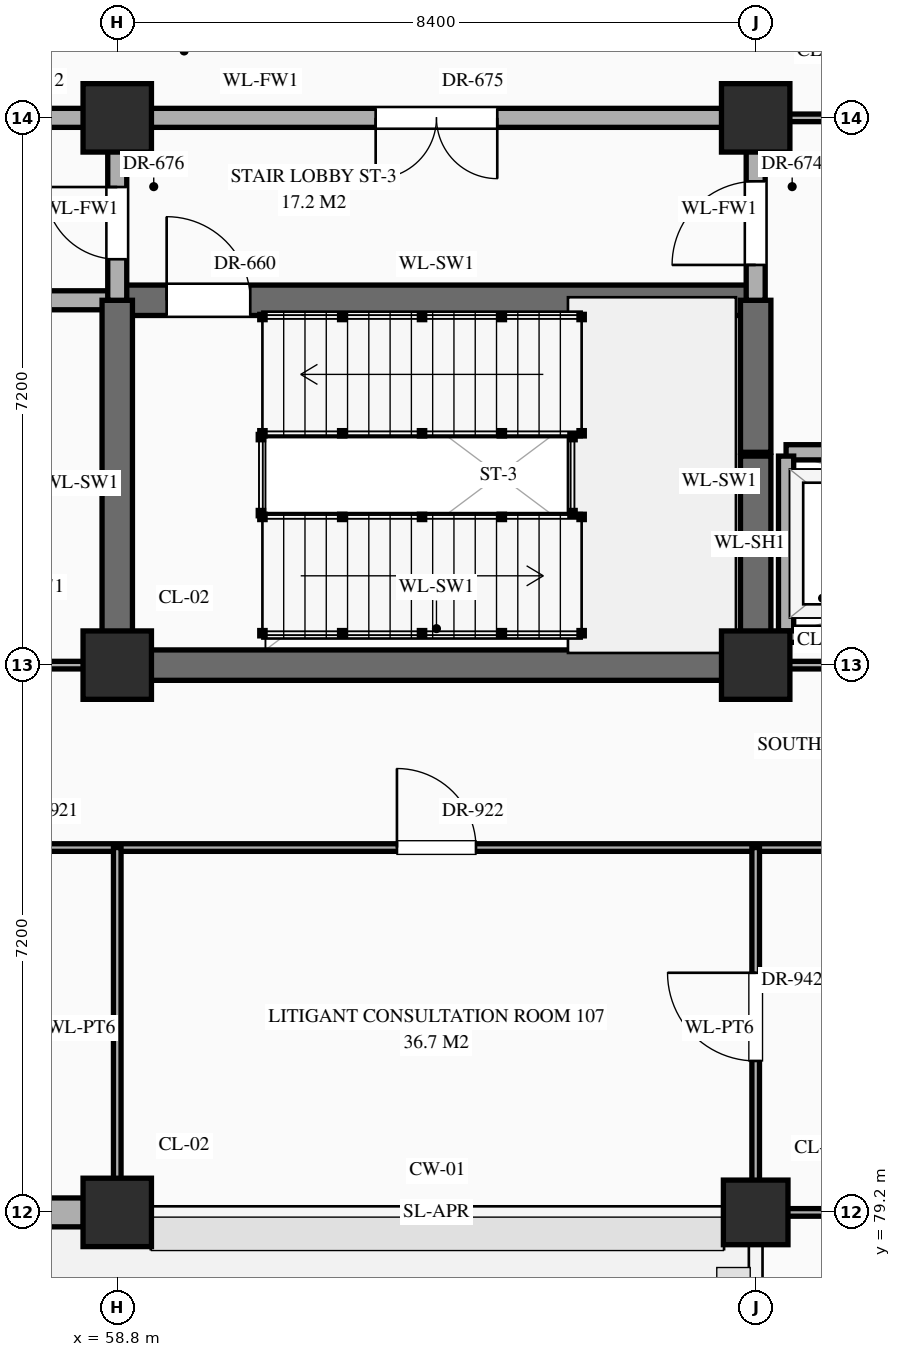
"""IFC4 building model, lengths in metres.
Left out: names, types, materials, properties, quantities, classifications, styles, units other than length and angle.
Written with IfcOpenShell. Run it as: python <this file> out.ifc"""

import sys

from ifc_helpers import new_model, si_unit, direction, frame, frame_2d, origin, origin_2d, place, context, subcontext, project, spatial, rectangle, circle, extrude, element, fill, save


model = new_model("IFC4")
c1 = context("Model", 3, precision=1e-05, world=origin(), true_north=direction((0.0, 1.0)))
c2 = subcontext(c1, "Body", "Model", "MODEL_VIEW")
j1 = project(units=[si_unit("LENGTHUNIT", "METRE"), si_unit("PLANEANGLEUNIT", "RADIAN")], contexts=[c1])
p1 = place(None, origin())
s1 = spatial("IfcSite", under=j1, at=p1, CompositionType="ELEMENT")
p2 = place(p1, origin())
s2 = spatial("IfcBuilding", under=s1, at=p2, CompositionType="ELEMENT")
p3 = place(p2, origin())
s3 = spatial("IfcBuildingStorey", under=s2, at=p3, CompositionType="ELEMENT", Elevation=0.0)
for number, where, z_axis, x_axis in (
    (1, (58.8, 79.2, 0.0), (0.0, 0.0, 1.0), (1.0, 0.0, 0.0)),
    (2, (58.8, 86.4, 0.0), (0.0, 0.0, 1.0), (1.0, 0.0, 0.0)),
    (3, (58.8, 93.6, 0.0), (0.0, 0.0, 1.0), (1.0, 0.0, 0.0)),
):
    element("IfcColumn", number, at=place(p3, frame(where, z_axis=z_axis, x_axis=x_axis)), inside=s3, PredefinedType="COLUMN", context=c2, shape_type="SweptSolid", body=[
        extrude(rectangle(XDim=0.9, YDim=0.9, at=origin_2d()), origin(), (0.0, 0.0, 1.0), 5.4),
    ])
p4 = place(p3, frame((67.2, 79.2, 0.0), z_axis=(0.0, 0.0, 1.0), x_axis=(1.0, 0.0, 0.0)))
e4 = element("IfcColumn", 4, at=p4, inside=s3, PredefinedType="COLUMN", context=c2, shape_type="SweptSolid", body=[
    extrude(circle(Radius=0.425, at=origin_2d()), origin(), (0.0, 0.0, 1.0), 5.4),
])
for number, where, z_axis, x_axis in (
    (5, (67.2, 86.4, 0.0), (0.0, 0.0, 1.0), (1.0, 0.0, 0.0)),
    (6, (67.2, 93.6, 0.0), (0.0, 0.0, 1.0), (1.0, 0.0, 0.0)),
):
    element("IfcColumn", number, at=place(p3, frame(where, z_axis=z_axis, x_axis=x_axis)), inside=s3, PredefinedType="COLUMN", context=c2, shape_type="SweptSolid", body=[
        extrude(rectangle(XDim=0.9, YDim=0.9, at=origin_2d()), origin(), (0.0, 0.0, 1.0), 5.4),
    ])
p5 = place(p3, frame((50.845, 79.2, 0.0), z_axis=(0.0, 0.0, 1.0), x_axis=(1.0, 0.0, 0.0)))
e7 = element("IfcWall", 7, at=p5, inside=s3, PredefinedType="STANDARD", context=c2, shape_type="SweptSolid", body=[
    extrude(rectangle(XDim=7.51, YDim=0.38, at=frame_2d((3.755, 0.0))), origin(), (0.0, 0.0, 1.0), 4.47),
])
p6 = place(p5, frame((3.155, 0.0, 0.0)))
e8 = element("IfcOpeningElement", 8, at=p6, cuts=e7, PredefinedType="OPENING", context=c2, shape_type="SweptSolid", body=[
    extrude(rectangle(XDim=1.2, YDim=2.2, at=frame_2d((0.6, 1.1))), frame((0.0, 0.202, 0.0), z_axis=(0.0, -1.0, 0.0), x_axis=(1.0, 0.0, 0.0)), (0.0, 0.0, 1.0), 0.404),
])
p7 = place(p3, frame((67.24, 79.2, 0.0), z_axis=(0.0, 0.0, 1.0), x_axis=(1.0, 0.0, 0.0)))
e9 = element("IfcWall", 9, at=p7, inside=s3, PredefinedType="STANDARD", context=c2, shape_type="SweptSolid", body=[
    extrude(rectangle(XDim=33.52, YDim=0.1, at=frame_2d((16.76, 0.0))), origin(), (0.0, 0.0, 1.0), 4.27),
])
p8 = place(p7, frame((11.71, 0.0, 0.0)))
e10 = element("IfcOpeningElement", 10, at=p8, cuts=e9, PredefinedType="OPENING", context=c2, shape_type="SweptSolid", body=[
    extrude(rectangle(XDim=1.7, YDim=2.45, at=frame_2d((0.85, 1.225))), frame((0.0, 0.062, 0.0), z_axis=(0.0, -1.0, 0.0), x_axis=(1.0, 0.0, 0.0)), (0.0, 0.0, 1.0), 0.124),
])
p9 = place(p3, frame((56.0, 84.0, 0.0), z_axis=(0.0, 0.0, 1.0), x_axis=(1.0, 0.0, 0.0)))
e11 = element("IfcWall", 11, at=p9, inside=s3, PredefinedType="STANDARD", context=c2, shape_type="SweptSolid", body=[
    extrude(rectangle(XDim=56.0, YDim=0.1, at=frame_2d((28.0, 0.0))), origin(), (0.0, 0.0, 1.0), 5.12),
])
p10 = place(p9, frame((0.9, 0.0, 0.0)))
e12 = element("IfcOpeningElement", 12, at=p10, cuts=e11, PredefinedType="OPENING", context=c2, shape_type="SweptSolid", body=[
    extrude(rectangle(XDim=1.0, YDim=2.25, at=frame_2d((0.5, 1.125))), frame((0.0, 0.062, 0.0), z_axis=(0.0, -1.0, 0.0), x_axis=(1.0, 0.0, 0.0)), (0.0, 0.0, 1.0), 0.124),
])
p11 = place(p9, frame((6.48, 0.0, 0.0)))
e13 = element("IfcOpeningElement", 13, at=p11, cuts=e11, PredefinedType="OPENING", context=c2, shape_type="SweptSolid", body=[
    extrude(rectangle(XDim=1.04, YDim=2.2, at=frame_2d((0.52, 1.1))), frame((0.0, 0.062, 0.0), z_axis=(0.0, -1.0, 0.0), x_axis=(1.0, 0.0, 0.0)), (0.0, 0.0, 1.0), 0.124),
])
p12 = place(p9, frame((18.7, 0.0, 0.0)))
e14 = element("IfcOpeningElement", 14, at=p12, cuts=e11, PredefinedType="OPENING", context=c2, shape_type="SweptSolid", body=[
    extrude(rectangle(XDim=1.8, YDim=2.5, at=frame_2d((0.9, 1.25))), frame((0.0, 0.062, 0.0), z_axis=(0.0, -1.0, 0.0), x_axis=(1.0, 0.0, 0.0)), (0.0, 0.0, 1.0), 0.124),
])
p13 = place(p9, frame((35.625, 0.0, 0.0)))
e15 = element("IfcOpeningElement", 15, at=p13, cuts=e11, PredefinedType="OPENING", context=c2, shape_type="SweptSolid", body=[
    extrude(rectangle(XDim=1.55, YDim=2.35, at=frame_2d((0.775, 1.175))), frame((0.0, 0.062, 0.0), z_axis=(0.0, -1.0, 0.0), x_axis=(1.0, 0.0, 0.0)), (0.0, 0.0, 1.0), 0.124),
])
p14 = place(p9, frame((48.4, 0.0, 0.0)))
e16 = element("IfcOpeningElement", 16, at=p14, cuts=e11, PredefinedType="OPENING", context=c2, shape_type="SweptSolid", body=[
    extrude(rectangle(XDim=1.2, YDim=2.35, at=frame_2d((0.6, 1.175))), frame((0.0, 0.062, 0.0), z_axis=(0.0, -1.0, 0.0), x_axis=(1.0, 0.0, 0.0)), (0.0, 0.0, 1.0), 0.124),
])
p15 = place(p9, frame((53.98, 0.0, 0.0)))
e17 = element("IfcOpeningElement", 17, at=p15, cuts=e11, PredefinedType="OPENING", context=c2, shape_type="SweptSolid", body=[
    extrude(rectangle(XDim=1.24, YDim=2.3, at=frame_2d((0.62, 1.15))), frame((0.0, 0.062, 0.0), z_axis=(0.0, -1.0, 0.0), x_axis=(1.0, 0.0, 0.0)), (0.0, 0.0, 1.0), 0.124),
])
p16 = place(p3, frame((56.0, 86.4, 0.0), z_axis=(0.0, 0.0, 1.0), x_axis=(1.0, 0.0, 0.0)))
e18 = element("IfcWall", 18, at=p16, inside=s3, PredefinedType="STANDARD", context=c2, shape_type="SweptSolid", body=[
    extrude(rectangle(XDim=2.8, YDim=0.1, at=frame_2d((1.4, 0.0))), origin(), (0.0, 0.0, 1.0), 4.27),
])
p17 = place(p16, frame((0.695, 0.0, 0.0)))
e19 = element("IfcOpeningElement", 19, at=p17, cuts=e18, PredefinedType="OPENING", context=c2, shape_type="SweptSolid", body=[
    extrude(rectangle(XDim=1.04, YDim=2.2, at=frame_2d((0.52, 1.1))), frame((0.0, 0.062, 0.0), z_axis=(0.0, -1.0, 0.0), x_axis=(1.0, 0.0, 0.0)), (0.0, 0.0, 1.0), 0.124),
])
p18 = place(p3, frame((58.8, 86.4, 0.0), z_axis=(0.0, 0.0, 1.0), x_axis=(1.0, 0.0, 0.0)))
e20 = element("IfcWall", 20, at=p18, inside=s3, PredefinedType="SHEAR", context=c2, shape_type="SweptSolid", body=[
    extrude(rectangle(XDim=8.4, YDim=0.4, at=frame_2d((4.2, 0.0))), origin(), (0.0, 0.0, 1.0), 5.12),
])
p19 = place(p3, frame((67.25, 86.4, 0.0), z_axis=(0.0, 0.0, 1.0), x_axis=(1.0, 0.0, 0.0)))
e21 = element("IfcWall", 21, at=p19, inside=s3, PredefinedType="STANDARD", context=c2, shape_type="SweptSolid", body=[
    extrude(rectangle(XDim=8.3, YDim=0.1, at=frame_2d((4.15, 0.0))), origin(), (0.0, 0.0, 1.0), 4.27),
])
p20 = place(p3, frame((67.6, 86.8, 0.0), z_axis=(0.0, 0.0, 1.0), x_axis=(1.0, 0.0, 0.0)))
e22 = element("IfcWall", 22, at=p20, inside=s3, PredefinedType="STANDARD", context=c2, shape_type="SweptSolid", body=[
    extrude(rectangle(XDim=2.5, YDim=0.2, at=frame_2d((1.25, 0.0))), origin(), (0.0, 0.0, 1.0), 5.12),
])
p21 = place(p3, frame((67.6, 89.2, 0.0), z_axis=(0.0, 0.0, 1.0), x_axis=(1.0, 0.0, 0.0)))
e23 = element("IfcWall", 23, at=p21, inside=s3, PredefinedType="STANDARD", context=c2, shape_type="SweptSolid", body=[
    extrude(rectangle(XDim=7.7, YDim=0.2, at=frame_2d((3.85, 0.0))), origin(), (0.0, 0.0, 1.0), 5.12),
])
p22 = place(p21, frame((0.725, 0.0, 0.0)))
e24 = element("IfcOpeningElement", 24, at=p22, cuts=e23, PredefinedType="OPENING", context=c2, shape_type="SweptSolid", body=[
    extrude(rectangle(XDim=1.1, YDim=2.15, at=frame_2d((0.55, 1.075))), frame((0.0, 0.112, 0.0), z_axis=(0.0, -1.0, 0.0), x_axis=(1.0, 0.0, 0.0)), (0.0, 0.0, 1.0), 0.224),
])
p23 = place(p21, frame((3.3, 0.0, 0.0)))
e25 = element("IfcOpeningElement", 25, at=p23, cuts=e23, PredefinedType="OPENING", context=c2, shape_type="SweptSolid", body=[
    extrude(rectangle(XDim=1.1, YDim=2.15, at=frame_2d((0.55, 1.075))), frame((0.0, 0.112, 0.0), z_axis=(0.0, -1.0, 0.0), x_axis=(1.0, 0.0, 0.0)), (0.0, 0.0, 1.0), 0.224),
])
p24 = place(p21, frame((5.875, 0.0, 0.0)))
e26 = element("IfcOpeningElement", 26, at=p24, cuts=e23, PredefinedType="OPENING", context=c2, shape_type="SweptSolid", body=[
    extrude(rectangle(XDim=1.1, YDim=2.15, at=frame_2d((0.55, 1.075))), frame((0.0, 0.112, 0.0), z_axis=(0.0, -1.0, 0.0), x_axis=(1.0, 0.0, 0.0)), (0.0, 0.0, 1.0), 0.224),
])
p25 = place(p3, frame((56.0, 91.2, 0.0), z_axis=(0.0, 0.0, 1.0), x_axis=(1.0, 0.0, 0.0)))
e27 = element("IfcWall", 27, at=p25, inside=s3, PredefinedType="STANDARD", context=c2, shape_type="SweptSolid", body=[
    extrude(rectangle(XDim=2.8, YDim=0.25, at=frame_2d((1.4, 0.0))), origin(), (0.0, 0.0, 1.0), 5.12),
])
p26 = place(p3, frame((58.8, 91.2, 0.0), z_axis=(0.0, 0.0, 1.0), x_axis=(1.0, 0.0, 0.0)))
e28 = element("IfcWall", 28, at=p26, inside=s3, PredefinedType="SHEAR", context=c2, shape_type="SweptSolid", body=[
    extrude(rectangle(XDim=8.4, YDim=0.4, at=frame_2d((4.2, 0.0))), origin(), (0.0, 0.0, 1.0), 5.12),
])
p27 = place(p26, frame((0.65, 0.0, 0.0)))
e29 = element("IfcOpeningElement", 29, at=p27, cuts=e28, PredefinedType="OPENING", context=c2, shape_type="SweptSolid", body=[
    extrude(rectangle(XDim=1.1, YDim=2.2, at=frame_2d((0.55, 1.1))), frame((0.0, 0.212, 0.0), z_axis=(0.0, -1.0, 0.0), x_axis=(1.0, 0.0, 0.0)), (0.0, 0.0, 1.0), 0.424),
])
p28 = place(p3, frame((42.0, 93.6, 0.0), z_axis=(0.0, 0.0, 1.0), x_axis=(1.0, 0.0, 0.0)))
e30 = element("IfcWall", 30, at=p28, inside=s3, PredefinedType="STANDARD", context=c2, shape_type="SweptSolid", body=[
    extrude(rectangle(XDim=25.2, YDim=0.25, at=frame_2d((12.6, 0.0))), origin(), (0.0, 0.0, 1.0), 4.27),
])
p29 = place(p28, frame((20.2, 0.0, 0.0)))
e31 = element("IfcOpeningElement", 31, at=p29, cuts=e30, PredefinedType="OPENING", context=c2, shape_type="SweptSolid", body=[
    extrude(rectangle(XDim=1.6, YDim=2.3, at=frame_2d((0.8, 1.15))), frame((0.0, 0.137, 0.0), z_axis=(0.0, -1.0, 0.0), x_axis=(1.0, 0.0, 0.0)), (0.0, 0.0, 1.0), 0.274),
])
p30 = place(p28, frame((3.288, 0.0, 0.0)))
e32 = element("IfcOpeningElement", 32, at=p30, cuts=e30, PredefinedType="OPENING", context=c2, shape_type="SweptSolid", body=[
    extrude(rectangle(XDim=1.8, YDim=2.35, at=frame_2d((0.9, 1.175))), frame((0.0, 0.137, 0.0), z_axis=(0.0, -1.0, 0.0), x_axis=(1.0, 0.0, 0.0)), (0.0, 0.0, 1.0), 0.274),
])
p31 = place(p28, frame((8.985, 0.0, 0.0)))
e33 = element("IfcOpeningElement", 33, at=p31, cuts=e30, PredefinedType="OPENING", context=c2, shape_type="SweptSolid", body=[
    extrude(rectangle(XDim=2.0, YDim=2.4, at=frame_2d((1.0, 1.2))), frame((0.0, 0.137, 0.0), z_axis=(0.0, -1.0, 0.0), x_axis=(1.0, 0.0, 0.0)), (0.0, 0.0, 1.0), 0.274),
])
p32 = place(p28, frame((12.125, 0.0, 0.0)))
e34 = element("IfcOpeningElement", 34, at=p32, cuts=e30, PredefinedType="OPENING", context=c2, shape_type="SweptSolid", body=[
    extrude(rectangle(XDim=0.95, YDim=2.15, at=frame_2d((0.475, 1.075))), frame((0.0, 0.137, 0.0), z_axis=(0.0, -1.0, 0.0), x_axis=(1.0, 0.0, 0.0)), (0.0, 0.0, 1.0), 0.274),
])
p33 = place(p28, frame((14.665, 0.0, 0.0)))
e35 = element("IfcOpeningElement", 35, at=p33, cuts=e30, PredefinedType="OPENING", context=c2, shape_type="SweptSolid", body=[
    extrude(rectangle(XDim=1.1, YDim=2.2, at=frame_2d((0.55, 1.1))), frame((0.0, 0.137, 0.0), z_axis=(0.0, -1.0, 0.0), x_axis=(1.0, 0.0, 0.0)), (0.0, 0.0, 1.0), 0.274),
])
p34 = place(p3, frame((67.2, 93.6, 0.0), z_axis=(0.0, 0.0, 1.0), x_axis=(1.0, 0.0, 0.0)))
e36 = element("IfcWall", 36, at=p34, inside=s3, PredefinedType="STANDARD", context=c2, shape_type="SweptSolid", body=[
    extrude(rectangle(XDim=33.6, YDim=0.1, at=frame_2d((16.8, 0.0))), origin(), (0.0, 0.0, 1.0), 4.27),
])
p35 = place(p34, frame((3.425, 0.0, 0.0)))
e37 = element("IfcOpeningElement", 37, at=p35, cuts=e36, PredefinedType="OPENING", context=c2, shape_type="SweptSolid", body=[
    extrude(rectangle(XDim=1.55, YDim=2.35, at=frame_2d((0.775, 1.175))), frame((0.0, 0.062, 0.0), z_axis=(0.0, -1.0, 0.0), x_axis=(1.0, 0.0, 0.0)), (0.0, 0.0, 1.0), 0.124),
])
p36 = place(p34, frame((28.55, 0.0, 0.0)))
e38 = element("IfcOpeningElement", 38, at=p36, cuts=e36, PredefinedType="OPENING", context=c2, shape_type="SweptSolid", body=[
    extrude(rectangle(XDim=1.7, YDim=2.45, at=frame_2d((0.85, 1.225))), frame((0.0, 0.062, 0.0), z_axis=(0.0, -1.0, 0.0), x_axis=(1.0, 0.0, 0.0)), (0.0, 0.0, 1.0), 0.124),
])
p37 = place(p34, frame((11.7, 0.0, 0.0)))
e39 = element("IfcOpeningElement", 39, at=p37, cuts=e36, PredefinedType="OPENING", context=c2, shape_type="SweptSolid", body=[
    extrude(rectangle(XDim=1.8, YDim=2.5, at=frame_2d((0.9, 1.25))), frame((0.0, 0.062, 0.0), z_axis=(0.0, -1.0, 0.0), x_axis=(1.0, 0.0, 0.0)), (0.0, 0.0, 1.0), 0.124),
])
p38 = place(p34, frame((17.885, 0.0, 0.0)))
e40 = element("IfcOpeningElement", 40, at=p38, cuts=e36, PredefinedType="OPENING", context=c2, shape_type="SweptSolid", body=[
    extrude(rectangle(XDim=1.0, YDim=2.25, at=frame_2d((0.5, 1.125))), frame((0.0, 0.062, 0.0), z_axis=(0.0, -1.0, 0.0), x_axis=(1.0, 0.0, 0.0)), (0.0, 0.0, 1.0), 0.124),
])
p39 = place(p34, frame((20.48, 0.0, 0.0)))
e41 = element("IfcOpeningElement", 41, at=p39, cuts=e36, PredefinedType="OPENING", context=c2, shape_type="SweptSolid", body=[
    extrude(rectangle(XDim=1.04, YDim=2.2, at=frame_2d((0.52, 1.1))), frame((0.0, 0.062, 0.0), z_axis=(0.0, -1.0, 0.0), x_axis=(1.0, 0.0, 0.0)), (0.0, 0.0, 1.0), 0.124),
])
p40 = place(p34, frame((23.075, 0.0, 0.0)))
e42 = element("IfcOpeningElement", 42, at=p40, cuts=e36, PredefinedType="OPENING", context=c2, shape_type="SweptSolid", body=[
    extrude(rectangle(XDim=1.08, YDim=2.25, at=frame_2d((0.54, 1.125))), frame((0.0, 0.062, 0.0), z_axis=(0.0, -1.0, 0.0), x_axis=(1.0, 0.0, 0.0)), (0.0, 0.0, 1.0), 0.124),
])
p41 = place(p3, frame((58.8, 79.24, 0.0), z_axis=(0.0, 0.0, 1.0), x_axis=(0.0, 1.0, 0.0)))
e43 = element("IfcWall", 43, at=p41, inside=s3, PredefinedType="STANDARD", context=c2, shape_type="SweptSolid", body=[
    extrude(rectangle(XDim=4.76, YDim=0.1, at=frame_2d((2.38, 0.0))), origin(), (0.0, 0.0, 1.0), 4.37),
])
p42 = place(p3, frame((58.8, 86.4, 0.0), z_axis=(0.0, 0.0, 1.0), x_axis=(0.0, 1.0, 0.0)))
e44 = element("IfcWall", 44, at=p42, inside=s3, PredefinedType="SHEAR", context=c2, shape_type="SweptSolid", body=[
    extrude(rectangle(XDim=4.8, YDim=0.4, at=frame_2d((2.4, 0.0))), origin(), (0.0, 0.0, 1.0), 5.12),
])
p43 = place(p3, frame((58.8, 91.2, 0.0), z_axis=(0.0, 0.0, 1.0), x_axis=(0.0, 1.0, 0.0)))
e45 = element("IfcWall", 45, at=p43, inside=s3, PredefinedType="STANDARD", context=c2, shape_type="SweptSolid", body=[
    extrude(rectangle(XDim=2.4, YDim=0.25, at=frame_2d((1.2, 0.0))), origin(), (0.0, 0.0, 1.0), 4.37),
])
p44 = place(p43, frame((0.54, 0.0, 0.0)))
e46 = element("IfcOpeningElement", 46, at=p44, cuts=e45, PredefinedType="OPENING", context=c2, shape_type="SweptSolid", body=[
    extrude(rectangle(XDim=0.95, YDim=2.15, at=frame_2d((0.475, 1.075))), frame((0.0, 0.137, 0.0), z_axis=(0.0, -1.0, 0.0), x_axis=(1.0, 0.0, 0.0)), (0.0, 0.0, 1.0), 0.274),
])
p45 = place(p3, frame((67.2, 79.24, 0.0), z_axis=(0.0, 0.0, 1.0), x_axis=(0.0, 1.0, 0.0)))
e47 = element("IfcWall", 47, at=p45, inside=s3, PredefinedType="STANDARD", context=c2, shape_type="SweptSolid", body=[
    extrude(rectangle(XDim=4.76, YDim=0.1, at=frame_2d((2.38, 0.0))), origin(), (0.0, 0.0, 1.0), 4.37),
])
p46 = place(p45, frame((1.952, 0.0, 0.0)))
e48 = element("IfcOpeningElement", 48, at=p46, cuts=e47, PredefinedType="OPENING", context=c2, shape_type="SweptSolid", body=[
    extrude(rectangle(XDim=1.16, YDim=2.3, at=frame_2d((0.58, 1.15))), frame((0.0, 0.062, 0.0), z_axis=(0.0, -1.0, 0.0), x_axis=(1.0, 0.0, 0.0)), (0.0, 0.0, 1.0), 0.124),
])
p47 = place(p3, frame((67.2, 86.45, 0.0), z_axis=(0.0, 0.0, 1.0), x_axis=(0.0, 1.0, 0.0)))
e49 = element("IfcWall", 49, at=p47, inside=s3, PredefinedType="SHEAR", context=c2, shape_type="SweptSolid", body=[
    extrude(rectangle(XDim=2.7, YDim=0.4, at=frame_2d((1.35, 0.0))), origin(), (0.0, 0.0, 1.0), 5.12),
])
p48 = place(p3, frame((67.2, 89.2, 0.0), z_axis=(0.0, 0.0, 1.0), x_axis=(0.0, 1.0, 0.0)))
e50 = element("IfcWall", 50, at=p48, inside=s3, PredefinedType="SHEAR", context=c2, shape_type="SweptSolid", body=[
    extrude(rectangle(XDim=2.0, YDim=0.4, at=frame_2d((1.0, 0.0))), origin(), (0.0, 0.0, 1.0), 5.12),
])
p49 = place(p3, frame((67.2, 91.2, 0.0), z_axis=(0.0, 0.0, 1.0), x_axis=(0.0, 1.0, 0.0)))
e51 = element("IfcWall", 51, at=p49, inside=s3, PredefinedType="STANDARD", context=c2, shape_type="SweptSolid", body=[
    extrude(rectangle(XDim=2.4, YDim=0.25, at=frame_2d((1.2, 0.0))), origin(), (0.0, 0.0, 1.0), 4.37),
])
p50 = place(p49, frame((0.465, 0.0, 0.0)))
e52 = element("IfcOpeningElement", 52, at=p50, cuts=e51, PredefinedType="OPENING", context=c2, shape_type="SweptSolid", body=[
    extrude(rectangle(XDim=1.1, YDim=2.2, at=frame_2d((0.55, 1.1))), frame((0.0, 0.137, 0.0), z_axis=(0.0, -1.0, 0.0), x_axis=(1.0, 0.0, 0.0)), (0.0, 0.0, 1.0), 0.274),
])
p51 = place(p3, frame((67.6, 86.85, 0.0), z_axis=(0.0, 0.0, 1.0), x_axis=(0.0, 1.0, 0.0)))
e53 = element("IfcWall", 53, at=p51, inside=s3, PredefinedType="STANDARD", context=c2, shape_type="SweptSolid", body=[
    extrude(rectangle(XDim=2.3, YDim=0.2, at=frame_2d((1.15, 0.0))), origin(), (0.0, 0.0, 1.0), 5.12),
])
p52 = place(p27, origin())
e54 = element("IfcDoor", 54, at=p52, inside=s3, OperationType="SINGLE_SWING_LEFT", PredefinedType="DOOR", context=c2, shape_type="SweptSolid", body=[
    extrude(rectangle(XDim=1.1, YDim=2.2, at=frame_2d((0.55, 1.1))), frame((0.0, 0.025, 0.0), z_axis=(0.0, -1.0, 0.0), x_axis=(1.0, 0.0, 0.0)), (0.0, 0.0, 1.0), 0.05),
])
fill(e29, e54)
p53 = place(p50, origin())
e55 = element("IfcDoor", 55, at=p53, inside=s3, OperationType="SINGLE_SWING_LEFT", PredefinedType="DOOR", context=c2, shape_type="SweptSolid", body=[
    extrude(rectangle(XDim=1.1, YDim=2.2, at=frame_2d((0.55, 1.1))), frame((0.0, 0.025, 0.0), z_axis=(0.0, -1.0, 0.0), x_axis=(1.0, 0.0, 0.0)), (0.0, 0.0, 1.0), 0.05),
])
fill(e52, e55)
p54 = place(p29, frame((1.6, 0.0, 0.0), z_axis=(0.0, 0.0, 1.0), x_axis=(-1.0, 0.0, 0.0)))
e56 = element("IfcDoor", 56, at=p54, inside=s3, OperationType="DOUBLE_DOOR_SINGLE_SWING", PredefinedType="DOOR", context=c2, shape_type="SweptSolid", body=[
    extrude(rectangle(XDim=1.6, YDim=2.3, at=frame_2d((0.8, 1.15))), frame((0.0, 0.025, 0.0), z_axis=(0.0, -1.0, 0.0), x_axis=(1.0, 0.0, 0.0)), (0.0, 0.0, 1.0), 0.05),
])
fill(e31, e56)
p55 = place(p44, origin())
e57 = element("IfcDoor", 57, at=p55, inside=s3, OperationType="SINGLE_SWING_RIGHT", PredefinedType="DOOR", context=c2, shape_type="SweptSolid", body=[
    extrude(rectangle(XDim=0.95, YDim=2.15, at=frame_2d((0.475, 1.075))), frame((0.0, 0.025, 0.0), z_axis=(0.0, -1.0, 0.0), x_axis=(1.0, 0.0, 0.0)), (0.0, 0.0, 1.0), 0.05),
])
fill(e46, e57)
p56 = place(p11, origin())
e58 = element("IfcDoor", 58, at=p56, inside=s3, OperationType="SINGLE_SWING_LEFT", PredefinedType="DOOR", context=c2, shape_type="SweptSolid", body=[
    extrude(rectangle(XDim=1.04, YDim=2.2, at=frame_2d((0.52, 1.1))), frame((0.0, 0.025, 0.0), z_axis=(0.0, -1.0, 0.0), x_axis=(1.0, 0.0, 0.0)), (0.0, 0.0, 1.0), 0.05),
])
fill(e13, e58)
p57 = place(p46, origin())
e59 = element("IfcDoor", 59, at=p57, inside=s3, OperationType="SINGLE_SWING_RIGHT", PredefinedType="DOOR", context=c2, shape_type="SweptSolid", body=[
    extrude(rectangle(XDim=1.16, YDim=2.3, at=frame_2d((0.58, 1.15))), frame((0.0, 0.025, 0.0), z_axis=(0.0, -1.0, 0.0), x_axis=(1.0, 0.0, 0.0)), (0.0, 0.0, 1.0), 0.05),
])
fill(e48, e59)
save(model, sys.argv[1])
